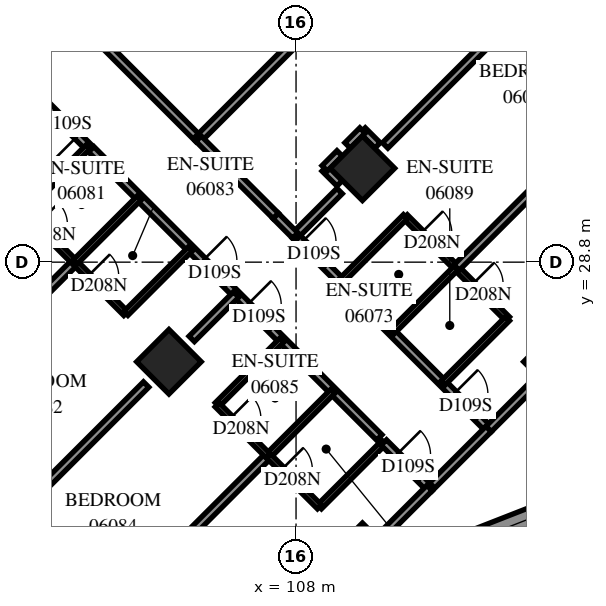
"""IFC4 building model, lengths in metres.
Left out: names, types, materials, properties, quantities, classifications, styles, units other than length and angle.
Written with IfcOpenShell. Run it as: python <this file> out.ifc"""

import sys

from ifc_helpers import new_model, si_unit, direction, frame, frame_2d, origin, origin_2d, place, context, subcontext, project, spatial, polyline, rectangle, outline, extrude, element, fill, save


model = new_model("IFC4")
c1 = context("Model", 3, precision=1e-05, world=origin(), true_north=direction((0.0, 1.0)))
c2 = subcontext(c1, "Body", "Model", "MODEL_VIEW")
j1 = project(units=[si_unit("LENGTHUNIT", "METRE"), si_unit("PLANEANGLEUNIT", "RADIAN")], contexts=[c1])
p1 = place(None, origin())
s1 = spatial("IfcSite", under=j1, at=p1, CompositionType="ELEMENT")
p2 = place(p1, origin())
s2 = spatial("IfcBuilding", under=s1, at=p2, CompositionType="ELEMENT")
p3 = place(p2, frame((0.0, 0.0, 27.0)))
s3 = spatial("IfcBuildingStorey", under=s2, at=p3, CompositionType="ELEMENT", Elevation=27.0)
for number, where, z_axis, x_axis in (
    (1, (109.747, 31.271, 0.0), (0.0, 0.0, 1.0), (0.707, -0.707, 0.0)),
    (2, (104.656, 26.18, 0.0), (0.0, 0.0, 1.0), (0.707, -0.707, 0.0)),
    (3, (114.838, 26.18, 0.0), (0.0, 0.0, 1.0), (0.707, -0.707, 0.0)),
    (4, (109.747, 21.088, 0.0), (0.0, 0.0, 1.0), (0.707, -0.707, 0.0)),
):
    element("IfcColumn", number, at=place(p3, frame(where, z_axis=z_axis, x_axis=x_axis)), inside=s3, PredefinedType="COLUMN", context=c2, shape_type="SweptSolid", body=[
        extrude(rectangle(XDim=1.2, YDim=1.2, at=origin_2d()), origin(), (0.0, 0.0, 1.0), 3.1),
    ])
p4 = place(p3, frame((111.055, 20.841, 0.0), z_axis=(0.0, 0.0, 1.0), x_axis=(0.9313442446, 0.3641399428, 0.0)))
e5 = element("IfcWall", 5, at=p4, inside=s3, PredefinedType="SOLIDWALL", context=c2, shape_type="SweptSolid", body=[
    extrude(outline(polyline([(0.12, -0.275), (5.606, -0.275), (5.354, 0.275), (-0.12, 0.275), (0.12, -0.275)])), origin(), (0.0, 0.0, 1.0), 3.1),
])
p5 = place(p4, frame((1.118, 0.0, 0.5)))
e6 = element("IfcOpeningElement", 6, at=p5, cuts=e5, PredefinedType="OPENING", context=c2, shape_type="SweptSolid", body=[
    extrude(rectangle(XDim=2.8, YDim=2.45, at=frame_2d((1.4, 1.225))), frame((0.0, 0.285, 0.0), z_axis=(0.0, -1.0, 0.0), x_axis=(1.0, 0.0, 0.0)), (0.0, 0.0, 1.0), 0.57),
])
p6 = place(p3, frame((117.915, 27.805, 0.0), z_axis=(0.0, 0.0, 1.0), x_axis=(-0.7071067812, 0.7071067812, 0.0)))
e7 = element("IfcWall", 7, at=p6, inside=s3, PredefinedType="SOLIDWALL", context=c2, shape_type="SweptSolid", body=[
    extrude(outline(polyline([(-0.173, -0.275), (4.627, -0.275), (5.177, 0.275), (0.173, 0.275), (-0.173, -0.275)])), origin(), (0.0, 0.0, 1.0), 3.1),
])
p7 = place(p6, frame((1.964, 0.0, 0.6)))
e8 = element("IfcOpeningElement", 8, at=p7, cuts=e7, PredefinedType="OPENING", context=c2, shape_type="SweptSolid", body=[
    extrude(rectangle(XDim=1.8, YDim=1.9, at=frame_2d((0.9, 0.95))), frame((0.0, 0.285, 0.0), z_axis=(0.0, -1.0, 0.0), x_axis=(1.0, 0.0, 0.0)), (0.0, 0.0, 1.0), 0.57),
])
p8 = place(p3, frame((114.449, 31.271, 0.0), z_axis=(0.0, 0.0, 1.0), x_axis=(0.7070978821, 0.7071156801, 0.0)))
e9 = element("IfcWall", 9, at=p8, inside=s3, PredefinedType="SOLIDWALL", context=c2, shape_type="SweptSolid", body=[
    extrude(outline(polyline([(0.275, -0.275), (5.975, -0.275), (5.262, 0.275), (-0.275, 0.275), (0.275, -0.275)])), origin(), (0.0, 0.0, 1.0), 3.1),
])
p9 = place(p8, frame((1.137, 0.0, 0.6)))
e10 = element("IfcOpeningElement", 10, at=p9, cuts=e9, PredefinedType="OPENING", context=c2, shape_type="SweptSolid", body=[
    extrude(rectangle(XDim=1.8, YDim=1.9, at=frame_2d((0.9, 0.95))), frame((0.0, 0.285, 0.0), z_axis=(0.0, -1.0, 0.0), x_axis=(1.0, 0.0, 0.0)), (0.0, 0.0, 1.0), 0.57),
])
p10 = place(p3, frame((94.895, 42.581, 0.0), z_axis=(0.0, 0.0, 1.0), x_axis=(0.7071067812, -0.7071067812, 0.0)))
e11 = element("IfcWall", 11, at=p10, inside=s3, PredefinedType="PARTITIONING", context=c2, shape_type="SweptSolid", body=[
    extrude(rectangle(XDim=14.9, YDim=0.2, at=frame_2d((7.45, 0.0))), origin(), (0.0, 0.0, 1.0), 3.1),
])
p11 = place(p10, frame((2.8, 0.0, 0.0)))
e12 = element("IfcOpeningElement", 12, at=p11, cuts=e11, PredefinedType="OPENING", context=c2, shape_type="SweptSolid", body=[
    extrude(rectangle(XDim=0.9, YDim=2.1, at=frame_2d((0.45, 1.05))), frame((0.0, 0.11, 0.0), z_axis=(0.0, -1.0, 0.0), x_axis=(1.0, 0.0, 0.0)), (0.0, 0.0, 1.0), 0.22),
])
p12 = place(p10, frame((4.348, 0.0, 0.0)))
e13 = element("IfcOpeningElement", 13, at=p12, cuts=e11, PredefinedType="OPENING", context=c2, shape_type="SweptSolid", body=[
    extrude(rectangle(XDim=0.9, YDim=2.1, at=frame_2d((0.45, 1.05))), frame((0.0, 0.11, 0.0), z_axis=(0.0, -1.0, 0.0), x_axis=(1.0, 0.0, 0.0)), (0.0, 0.0, 1.0), 0.22),
])
p13 = place(p10, frame((10.073, 0.0, 0.0)))
e14 = element("IfcOpeningElement", 14, at=p13, cuts=e11, PredefinedType="OPENING", context=c2, shape_type="SweptSolid", body=[
    extrude(rectangle(XDim=1.0, YDim=2.1, at=frame_2d((0.5, 1.05))), frame((0.0, 0.11, 0.0), z_axis=(0.0, -1.0, 0.0), x_axis=(1.0, 0.0, 0.0)), (0.0, 0.0, 1.0), 0.22),
])
p14 = place(p3, frame((102.609, 31.769, 0.0), z_axis=(0.0, 0.0, 1.0), x_axis=(0.7071067812, -0.7071067812, 0.0)))
e15 = element("IfcWall", 15, at=p14, inside=s3, PredefinedType="PARTITIONING", context=c2, shape_type="SweptSolid", body=[
    extrude(rectangle(XDim=10.723, YDim=0.2, at=frame_2d((5.361, 0.0))), origin(), (0.0, 0.0, 1.0), 3.1),
])
p15 = place(p14, frame((4.15, 0.0, 0.0)))
e16 = element("IfcOpeningElement", 16, at=p15, cuts=e15, PredefinedType="OPENING", context=c2, shape_type="SweptSolid", body=[
    extrude(rectangle(XDim=0.9, YDim=2.1, at=frame_2d((0.45, 1.05))), frame((0.0, 0.11, 0.0), z_axis=(0.0, -1.0, 0.0), x_axis=(1.0, 0.0, 0.0)), (0.0, 0.0, 1.0), 0.22),
])
p16 = place(p14, frame((5.8, 0.0, 0.0)))
e17 = element("IfcOpeningElement", 17, at=p16, cuts=e15, PredefinedType="OPENING", context=c2, shape_type="SweptSolid", body=[
    extrude(rectangle(XDim=0.9, YDim=2.1, at=frame_2d((0.45, 1.05))), frame((0.0, 0.11, 0.0), z_axis=(0.0, -1.0, 0.0), x_axis=(1.0, 0.0, 0.0)), (0.0, 0.0, 1.0), 0.22),
])
p17 = place(p3, frame((105.437, 32.045, 0.0), z_axis=(0.0, 0.0, 1.0), x_axis=(0.7070125995, 0.7072009503, 0.0)))
e18 = element("IfcWall", 18, at=p17, inside=s3, PredefinedType="PARTITIONING", context=c2, shape_type="SweptSolid", body=[
    extrude(rectangle(XDim=10.618, YDim=0.2, at=frame_2d((5.309, 0.0))), origin(), (0.0, 0.0, 1.0), 3.1),
])
p18 = place(p3, frame((101.597, 18.038, 0.0), z_axis=(0.0, 0.0, 1.0), x_axis=(0.7072439346, 0.7069696012, 0.0)))
e19 = element("IfcWall", 19, at=p18, inside=s3, PredefinedType="PARTITIONING", context=c2, shape_type="SweptSolid", body=[
    extrude(rectangle(XDim=8.019, YDim=0.2, at=frame_2d((4.01, 0.0))), origin(), (0.0, 0.0, 1.0), 3.1),
])
p19 = place(p3, frame((96.54, 23.157, 0.0), z_axis=(0.0, 0.0, 1.0), x_axis=(0.7071067812, 0.7071067812, 0.0)))
e20 = element("IfcWall", 20, at=p19, inside=s3, PredefinedType="PARTITIONING", context=c2, shape_type="SweptSolid", body=[
    extrude(rectangle(XDim=7.977, YDim=0.2, at=frame_2d((3.989, 0.0))), origin(), (0.0, 0.0, 1.0), 3.1),
])
p20 = place(p3, frame((102.531, 31.833, 0.0), z_axis=(0.0, 0.0, 1.0), x_axis=(-0.7070095491, 0.7072039999, 0.0)))
e21 = element("IfcWall", 21, at=p20, inside=s3, PredefinedType="PARTITIONING", context=c2, shape_type="SweptSolid", body=[
    extrude(rectangle(XDim=7.2, YDim=0.2, at=frame_2d((3.6, 0.0))), origin(), (0.0, 0.0, 1.0), 3.1),
])
p21 = place(p20, frame((2.165, 0.0, 0.0)))
e22 = element("IfcOpeningElement", 22, at=p21, cuts=e21, PredefinedType="OPENING", context=c2, shape_type="SweptSolid", body=[
    extrude(rectangle(XDim=0.9, YDim=2.1, at=frame_2d((0.45, 1.05))), frame((0.0, 0.11, 0.0), z_axis=(0.0, -1.0, 0.0), x_axis=(1.0, 0.0, 0.0)), (0.0, 0.0, 1.0), 0.22),
])
p22 = place(p20, frame((0.4, 0.0, 0.0)))
e23 = element("IfcOpeningElement", 23, at=p22, cuts=e21, PredefinedType="OPENING", context=c2, shape_type="SweptSolid", body=[
    extrude(rectangle(XDim=0.9, YDim=2.1, at=frame_2d((0.45, 1.05))), frame((0.0, 0.11, 0.0), z_axis=(0.0, -1.0, 0.0), x_axis=(1.0, 0.0, 0.0)), (0.0, 0.0, 1.0), 0.22),
])
p23 = place(p3, frame((107.977, 29.499, 0.0), z_axis=(0.0, 0.0, 1.0), x_axis=(0.7071067812, -0.7071067812, 0.0)))
e24 = element("IfcWall", 24, at=p23, inside=s3, PredefinedType="PARTITIONING", context=c2, shape_type="SweptSolid", body=[
    extrude(rectangle(XDim=7.198, YDim=0.2, at=frame_2d((3.599, 0.0))), origin(), (0.0, 0.0, 1.0), 3.1),
])
p24 = place(p23, frame((0.247, 0.0, 0.0)))
e25 = element("IfcOpeningElement", 25, at=p24, cuts=e24, PredefinedType="OPENING", context=c2, shape_type="SweptSolid", body=[
    extrude(rectangle(XDim=0.9, YDim=2.1, at=frame_2d((0.45, 1.05))), frame((0.0, 0.11, 0.0), z_axis=(0.0, -1.0, 0.0), x_axis=(1.0, 0.0, 0.0)), (0.0, 0.0, 1.0), 0.22),
])
p25 = place(p23, frame((5.899, 0.0, 0.0)))
e26 = element("IfcOpeningElement", 26, at=p25, cuts=e24, PredefinedType="OPENING", context=c2, shape_type="SweptSolid", body=[
    extrude(rectangle(XDim=0.9, YDim=2.1, at=frame_2d((0.45, 1.05))), frame((0.0, 0.11, 0.0), z_axis=(0.0, -1.0, 0.0), x_axis=(1.0, 0.0, 0.0)), (0.0, 0.0, 1.0), 0.22),
])
for number, where, z_axis, x_axis in (
    (27, (110.345, 31.871, 0.0), (0.0, 0.0, 1.0), (0.707, 0.707, 0.0)),
    (28, (100.163, 21.689, 0.0), (0.0, 0.0, 1.0), (0.707, 0.707, 0.0)),
):
    element("IfcWall", number, at=place(p3, frame(where, z_axis=z_axis, x_axis=x_axis)), inside=s3, PredefinedType="PARTITIONING", context=c2, shape_type="SweptSolid", body=[
        extrude(rectangle(XDim=5.504, YDim=0.2, at=frame_2d((2.752, 0.0))), origin(), (0.0, 0.0, 1.0), 3.1),
    ])
p26 = place(p3, frame((110.875, 29.995, 0.0), z_axis=(0.0, 0.0, 1.0), x_axis=(0.7071067812, -0.7071067812, 0.0)))
e29 = element("IfcWall", 29, at=p26, inside=s3, PredefinedType="PARTITIONING", context=c2, shape_type="SweptSolid", body=[
    extrude(rectangle(XDim=3.801, YDim=0.15, at=frame_2d((1.901, 0.0))), origin(), (0.0, 0.0, 1.0), 3.1),
])
p27 = place(p26, frame((0.598, 0.0, 0.0)))
e30 = element("IfcOpeningElement", 30, at=p27, cuts=e29, PredefinedType="OPENING", context=c2, shape_type="SweptSolid", body=[
    extrude(rectangle(XDim=0.8, YDim=2.1, at=frame_2d((0.4, 1.05))), frame((0.0, 0.085, 0.0), z_axis=(0.0, -1.0, 0.0), x_axis=(1.0, 0.0, 0.0)), (0.0, 0.0, 1.0), 0.17),
])
p28 = place(p26, frame((2.507, 0.0, 0.0)))
e31 = element("IfcOpeningElement", 31, at=p28, cuts=e29, PredefinedType="OPENING", context=c2, shape_type="SweptSolid", body=[
    extrude(rectangle(XDim=0.8, YDim=2.1, at=frame_2d((0.4, 1.05))), frame((0.0, 0.085, 0.0), z_axis=(0.0, -1.0, 0.0), x_axis=(1.0, 0.0, 0.0)), (0.0, 0.0, 1.0), 0.17),
])
p29 = place(p3, frame((100.836, 30.138, 0.0), z_axis=(0.0, 0.0, 1.0), x_axis=(0.7065802685, -0.7076329021, 0.0)))
e32 = element("IfcWall", 32, at=p29, inside=s3, PredefinedType="PARTITIONING", context=c2, shape_type="SweptSolid", body=[
    extrude(rectangle(XDim=3.8, YDim=0.15, at=frame_2d((1.9, 0.0))), origin(), (0.0, 0.0, 1.0), 3.1),
])
p30 = place(p29, frame((0.493, 0.0, 0.0)))
e33 = element("IfcOpeningElement", 33, at=p30, cuts=e32, PredefinedType="OPENING", context=c2, shape_type="SweptSolid", body=[
    extrude(rectangle(XDim=0.8, YDim=2.1, at=frame_2d((0.4, 1.05))), frame((0.0, 0.085, 0.0), z_axis=(0.0, -1.0, 0.0), x_axis=(1.0, 0.0, 0.0)), (0.0, 0.0, 1.0), 0.17),
])
p31 = place(p29, frame((2.402, 0.0, 0.0)))
e34 = element("IfcOpeningElement", 34, at=p31, cuts=e32, PredefinedType="OPENING", context=c2, shape_type="SweptSolid", body=[
    extrude(rectangle(XDim=0.8, YDim=2.1, at=frame_2d((0.4, 1.05))), frame((0.0, 0.085, 0.0), z_axis=(0.0, -1.0, 0.0), x_axis=(1.0, 0.0, 0.0)), (0.0, 0.0, 1.0), 0.17),
])
p32 = place(p3, frame((112.221, 28.655, 0.0), z_axis=(0.0, 0.0, 1.0), x_axis=(0.7071067812, 0.7071067812, 0.0)))
e35 = element("IfcWall", 35, at=p32, inside=s3, PredefinedType="PARTITIONING", context=c2, shape_type="SweptSolid", body=[
    extrude(rectangle(XDim=3.15, YDim=0.2, at=frame_2d((1.575, 0.0))), origin(), (0.0, 0.0, 1.0), 3.1),
])
p33 = place(p3, frame((105.435, 32.049, 0.0), z_axis=(0.0, 0.0, 1.0), x_axis=(0.7074545101, -0.7067588812, 0.0)))
e36 = element("IfcWall", 36, at=p33, inside=s3, PredefinedType="PARTITIONING", context=c2, shape_type="SweptSolid", body=[
    extrude(rectangle(XDim=2.875, YDim=0.2, at=frame_2d((1.438, 0.0))), origin(), (0.0, 0.0, 1.0), 3.1),
])
for number, where, z_axis, x_axis in (
    (37, (103.523, 27.453, 0.0), (0.0, 0.0, 1.0), (0.707, 0.707, 0.0)),
    (38, (105.927, 25.049, 0.0), (0.0, 0.0, 1.0), (0.707, 0.707, 0.0)),
    (39, (107.271, 23.705, 0.0), (0.0, 0.0, 1.0), (0.707, 0.707, 0.0)),
):
    element("IfcWall", number, at=place(p3, frame(where, z_axis=z_axis, x_axis=x_axis)), inside=s3, PredefinedType="PARTITIONING", context=c2, shape_type="SweptSolid", body=[
        extrude(rectangle(XDim=2.401, YDim=0.15, at=frame_2d((1.201, 0.0))), origin(), (0.0, 0.0, 1.0), 3.1),
    ])
for number, where, z_axis, x_axis in (
    (40, (109.182, 28.3, 0.0), (0.0, 0.0, 1.0), (0.707, 0.708, 0.0)),
    (41, (111.865, 25.616, 0.0), (0.0, 0.0, 1.0), (0.708, 0.707, 0.0)),
    (42, (110.522, 26.96, 0.0), (0.0, 0.0, 1.0), (0.708, 0.707, 0.0)),
):
    element("IfcWall", number, at=place(p3, frame(where, z_axis=z_axis, x_axis=x_axis)), inside=s3, PredefinedType="PARTITIONING", context=c2, shape_type="SweptSolid", body=[
        extrude(rectangle(XDim=2.4, YDim=0.15, at=frame_2d((1.2, 0.0))), origin(), (0.0, 0.0, 1.0), 3.1),
    ])
for number, where, z_axis, x_axis in (
    (43, (100.837, 30.141, 0.0), (0.0, 0.0, 1.0), (0.707, 0.707, 0.0)),
    (44, (108.615, 22.363, 0.0), (0.0, 0.0, 1.0), (0.707, 0.707, 0.0)),
    (45, (102.181, 28.797, 0.0), (0.0, 0.0, 1.0), (0.707, 0.707, 0.0)),
):
    element("IfcWall", number, at=place(p3, frame(where, z_axis=z_axis, x_axis=x_axis)), inside=s3, PredefinedType="PARTITIONING", context=c2, shape_type="SweptSolid", body=[
        extrude(rectangle(XDim=2.398, YDim=0.15, at=frame_2d((1.199, 0.0))), origin(), (0.0, 0.0, 1.0), 3.1),
    ])
p34 = place(p3, frame((111.513, 22.857, 0.0), z_axis=(0.0, 0.0, 1.0), x_axis=(0.7071067812, 0.7071067812, 0.0)))
e46 = element("IfcWall", 46, at=p34, inside=s3, PredefinedType="PARTITIONING", context=c2, shape_type="SweptSolid", body=[
    extrude(rectangle(XDim=2.2, YDim=0.2, at=frame_2d((1.1, 0.0))), origin(), (0.0, 0.0, 1.0), 2.6),
])
p35 = place(p3, frame((105.925, 25.045, 0.0), z_axis=(0.0, 0.0, 1.0), x_axis=(0.7071067812, -0.7071067812, 0.0)))
e47 = element("IfcWall", 47, at=p35, inside=s3, PredefinedType="PARTITIONING", context=c2, shape_type="SweptSolid", body=[
    extrude(rectangle(XDim=1.901, YDim=0.15, at=frame_2d((0.95, 0.0))), origin(), (0.0, 0.0, 1.0), 3.1),
])
p36 = place(p35, frame((0.493, 0.0, 0.0)))
e48 = element("IfcOpeningElement", 48, at=p36, cuts=e47, PredefinedType="OPENING", context=c2, shape_type="SweptSolid", body=[
    extrude(rectangle(XDim=0.8, YDim=2.1, at=frame_2d((0.4, 1.05))), frame((0.0, 0.085, 0.0), z_axis=(0.0, -1.0, 0.0), x_axis=(1.0, 0.0, 0.0)), (0.0, 0.0, 1.0), 0.17),
])
p37 = place(p3, frame((107.272, 23.704, 0.0), z_axis=(0.0, 0.0, 1.0), x_axis=(0.7076330979, -0.7065800724, 0.0)))
e49 = element("IfcWall", 49, at=p37, inside=s3, PredefinedType="PARTITIONING", context=c2, shape_type="SweptSolid", body=[
    extrude(rectangle(XDim=1.899, YDim=0.15, at=frame_2d((0.95, 0.0))), origin(), (0.0, 0.0, 1.0), 3.1),
])
p38 = place(p37, frame((0.503, 0.0, 0.0)))
e50 = element("IfcOpeningElement", 50, at=p38, cuts=e49, PredefinedType="OPENING", context=c2, shape_type="SweptSolid", body=[
    extrude(rectangle(XDim=0.8, YDim=2.1, at=frame_2d((0.4, 1.05))), frame((0.0, 0.085, 0.0), z_axis=(0.0, -1.0, 0.0), x_axis=(1.0, 0.0, 0.0)), (0.0, 0.0, 1.0), 0.17),
])
p39 = place(p3, frame((110.309, 24.055, 0.0), z_axis=(0.0, 0.0, 1.0), x_axis=(0.7071067812, -0.7071067812, 0.0)))
e51 = element("IfcWall", 51, at=p39, inside=s3, PredefinedType="PARTITIONING", context=c2, shape_type="SweptSolid", body=[
    extrude(rectangle(XDim=1.7, YDim=0.2, at=frame_2d((0.85, 0.0))), origin(), (0.0, 0.0, 1.0), 3.1),
])
p40 = place(p39, frame((0.467, 0.0, 0.0)))
e52 = element("IfcOpeningElement", 52, at=p40, cuts=e51, PredefinedType="OPENING", context=c2, shape_type="SweptSolid", body=[
    extrude(rectangle(XDim=0.9, YDim=2.1, at=frame_2d((0.45, 1.05))), frame((0.0, 0.11, 0.0), z_axis=(0.0, -1.0, 0.0), x_axis=(1.0, 0.0, 0.0)), (0.0, 0.0, 1.0), 0.22),
])
p41 = place(p3, frame((105.255, 26.781, 0.0), z_axis=(0.0, 0.0, 1.0), x_axis=(0.7071067812, 0.7071067812, 0.0)))
e53 = element("IfcWall", 53, at=p41, inside=s3, PredefinedType="PARTITIONING", context=c2, shape_type="SweptSolid", body=[
    extrude(rectangle(XDim=1.652, YDim=0.2, at=frame_2d((0.826, 0.0))), origin(), (0.0, 0.0, 1.0), 3.1),
])
for number, where, z_axis, x_axis in (
    (54, (110.346, 21.689, 0.0), (0.0, 0.0, 1.0), (0.707, 0.707, 0.0)),
    (55, (113.07, 24.413, 0.0), (0.0, 0.0, 1.0), (0.707, 0.707, 0.0)),
):
    element("IfcWall", number, at=place(p3, frame(where, z_axis=z_axis, x_axis=x_axis)), inside=s3, PredefinedType="PARTITIONING", context=c2, shape_type="SweptSolid", body=[
        extrude(rectangle(XDim=1.652, YDim=0.2, at=frame_2d((0.826, 0.0))), origin(), (0.0, 0.0, 1.0), 2.6),
    ])
p42 = place(p3, frame((107.978, 29.504, 0.0), z_axis=(0.0, 0.0, 1.0), x_axis=(0.7071067812, 0.7071067812, 0.0)))
e56 = element("IfcWall", 56, at=p42, inside=s3, PredefinedType="PARTITIONING", context=c2, shape_type="SweptSolid", body=[
    extrude(rectangle(XDim=1.652, YDim=0.2, at=frame_2d((0.826, 0.0))), origin(), (0.0, 0.0, 1.0), 3.1),
])
p43 = place(p3, frame((107.466, 30.014, 0.0), z_axis=(0.0, 0.0, 1.0), x_axis=(0.7057270646, -0.7084838109, 0.0)))
e57 = element("IfcWall", 57, at=p43, inside=s3, PredefinedType="PARTITIONING", context=c2, shape_type="SweptSolid", body=[
    extrude(rectangle(XDim=0.726, YDim=0.2, at=frame_2d((0.363, 0.0))), origin(), (0.0, 0.0, 1.0), 3.1),
])
for number, where, z_axis, x_axis in (
    (58, (108.754, 31.268, 0.0), (0.0, 0.0, 1.0), (0.707, -0.707, 0.0)),
    (59, (109.751, 32.265, 0.0), (0.0, 0.0, 1.0), (0.707, -0.707, 0.0)),
    (60, (109.355, 31.871, 0.0), (0.0, 0.0, 1.0), (0.707, 0.707, 0.0)),
    (61, (108.753, 31.269, 0.0), (0.0, 0.0, 1.0), (0.707, 0.707, 0.0)),
):
    element("IfcWall", number, at=place(p3, frame(where, z_axis=z_axis, x_axis=x_axis)), inside=s3, PredefinedType="PARTITIONING", context=c2, shape_type="SweptSolid", body=[
        extrude(rectangle(XDim=0.557, YDim=0.2, at=frame_2d((0.279, 0.0))), origin(), (0.0, 0.0, 1.0), 3.1),
    ])
p44 = place(p5, origin())
e62 = element("IfcWindow", 62, at=p44, inside=s3, PartitioningType="SINGLE_PANEL", PredefinedType="WINDOW", context=c2, shape_type="SweptSolid", body=[
    extrude(rectangle(XDim=2.8, YDim=2.45, at=frame_2d((1.4, 1.225))), frame((0.0, 0.155, 0.0), z_axis=(0.0, -1.0, 0.0), x_axis=(1.0, 0.0, 0.0)), (0.0, 0.0, 1.0), 0.06),
])
fill(e6, e62)
p45 = place(p24, origin())
e63 = element("IfcDoor", 63, at=p45, inside=s3, OperationType="SINGLE_SWING_LEFT", PredefinedType="DOOR", context=c2, shape_type="SweptSolid", body=[
    extrude(rectangle(XDim=0.9, YDim=2.1, at=frame_2d((0.45, 1.05))), frame((0.0, 0.025, 0.0), z_axis=(0.0, -1.0, 0.0), x_axis=(1.0, 0.0, 0.0)), (0.0, 0.0, 1.0), 0.05),
])
fill(e25, e63)
p46 = place(p27, origin())
e64 = element("IfcDoor", 64, at=p46, inside=s3, OperationType="SINGLE_SWING_RIGHT", PredefinedType="DOOR", context=c2, shape_type="SweptSolid", body=[
    extrude(rectangle(XDim=0.8, YDim=2.1, at=frame_2d((0.4, 1.05))), frame((0.0, 0.025, 0.0), z_axis=(0.0, -1.0, 0.0), x_axis=(1.0, 0.0, 0.0)), (0.0, 0.0, 1.0), 0.05),
])
fill(e30, e64)
p47 = place(p22, origin())
e65 = element("IfcDoor", 65, at=p47, inside=s3, OperationType="SINGLE_SWING_RIGHT", PredefinedType="DOOR", context=c2, shape_type="SweptSolid", body=[
    extrude(rectangle(XDim=0.9, YDim=2.1, at=frame_2d((0.45, 1.05))), frame((0.0, 0.025, 0.0), z_axis=(0.0, -1.0, 0.0), x_axis=(1.0, 0.0, 0.0)), (0.0, 0.0, 1.0), 0.05),
])
fill(e23, e65)
p48 = place(p30, origin())
e66 = element("IfcDoor", 66, at=p48, inside=s3, OperationType="SINGLE_SWING_RIGHT", PredefinedType="DOOR", context=c2, shape_type="SweptSolid", body=[
    extrude(rectangle(XDim=0.8, YDim=2.1, at=frame_2d((0.4, 1.05))), frame((0.0, 0.025, 0.0), z_axis=(0.0, -1.0, 0.0), x_axis=(1.0, 0.0, 0.0)), (0.0, 0.0, 1.0), 0.05),
])
fill(e33, e66)
p49 = place(p15, origin())
e67 = element("IfcDoor", 67, at=p49, inside=s3, OperationType="SINGLE_SWING_LEFT", PredefinedType="DOOR", context=c2, shape_type="SweptSolid", body=[
    extrude(rectangle(XDim=0.9, YDim=2.1, at=frame_2d((0.45, 1.05))), frame((0.0, 0.025, 0.0), z_axis=(0.0, -1.0, 0.0), x_axis=(1.0, 0.0, 0.0)), (0.0, 0.0, 1.0), 0.05),
])
fill(e16, e67)
p50 = place(p31, origin())
e68 = element("IfcDoor", 68, at=p50, inside=s3, OperationType="SINGLE_SWING_RIGHT", PredefinedType="DOOR", context=c2, shape_type="SweptSolid", body=[
    extrude(rectangle(XDim=0.8, YDim=2.1, at=frame_2d((0.4, 1.05))), frame((0.0, 0.025, 0.0), z_axis=(0.0, -1.0, 0.0), x_axis=(1.0, 0.0, 0.0)), (0.0, 0.0, 1.0), 0.05),
])
fill(e34, e68)
p51 = place(p16, origin())
e69 = element("IfcDoor", 69, at=p51, inside=s3, OperationType="SINGLE_SWING_RIGHT", PredefinedType="DOOR", context=c2, shape_type="SweptSolid", body=[
    extrude(rectangle(XDim=0.9, YDim=2.1, at=frame_2d((0.45, 1.05))), frame((0.0, 0.025, 0.0), z_axis=(0.0, -1.0, 0.0), x_axis=(1.0, 0.0, 0.0)), (0.0, 0.0, 1.0), 0.05),
])
fill(e17, e69)
p52 = place(p36, origin())
e70 = element("IfcDoor", 70, at=p52, inside=s3, OperationType="SINGLE_SWING_RIGHT", PredefinedType="DOOR", context=c2, shape_type="SweptSolid", body=[
    extrude(rectangle(XDim=0.8, YDim=2.1, at=frame_2d((0.4, 1.05))), frame((0.0, 0.025, 0.0), z_axis=(0.0, -1.0, 0.0), x_axis=(1.0, 0.0, 0.0)), (0.0, 0.0, 1.0), 0.05),
])
fill(e48, e70)
p53 = place(p40, origin())
e71 = element("IfcDoor", 71, at=p53, inside=s3, OperationType="SINGLE_SWING_LEFT", PredefinedType="DOOR", context=c2, shape_type="SweptSolid", body=[
    extrude(rectangle(XDim=0.9, YDim=2.1, at=frame_2d((0.45, 1.05))), frame((0.0, 0.025, 0.0), z_axis=(0.0, -1.0, 0.0), x_axis=(1.0, 0.0, 0.0)), (0.0, 0.0, 1.0), 0.05),
])
fill(e52, e71)
p54 = place(p38, origin())
e72 = element("IfcDoor", 72, at=p54, inside=s3, OperationType="SINGLE_SWING_RIGHT", PredefinedType="DOOR", context=c2, shape_type="SweptSolid", body=[
    extrude(rectangle(XDim=0.8, YDim=2.1, at=frame_2d((0.4, 1.05))), frame((0.0, 0.025, 0.0), z_axis=(0.0, -1.0, 0.0), x_axis=(1.0, 0.0, 0.0)), (0.0, 0.0, 1.0), 0.05),
])
fill(e50, e72)
p55 = place(p25, origin())
e73 = element("IfcDoor", 73, at=p55, inside=s3, OperationType="SINGLE_SWING_RIGHT", PredefinedType="DOOR", context=c2, shape_type="SweptSolid", body=[
    extrude(rectangle(XDim=0.9, YDim=2.1, at=frame_2d((0.45, 1.05))), frame((0.0, 0.025, 0.0), z_axis=(0.0, -1.0, 0.0), x_axis=(1.0, 0.0, 0.0)), (0.0, 0.0, 1.0), 0.05),
])
fill(e26, e73)
p56 = place(p28, origin())
e74 = element("IfcDoor", 74, at=p56, inside=s3, OperationType="SINGLE_SWING_RIGHT", PredefinedType="DOOR", context=c2, shape_type="SweptSolid", body=[
    extrude(rectangle(XDim=0.8, YDim=2.1, at=frame_2d((0.4, 1.05))), frame((0.0, 0.025, 0.0), z_axis=(0.0, -1.0, 0.0), x_axis=(1.0, 0.0, 0.0)), (0.0, 0.0, 1.0), 0.05),
])
fill(e31, e74)
save(model, sys.argv[1])
